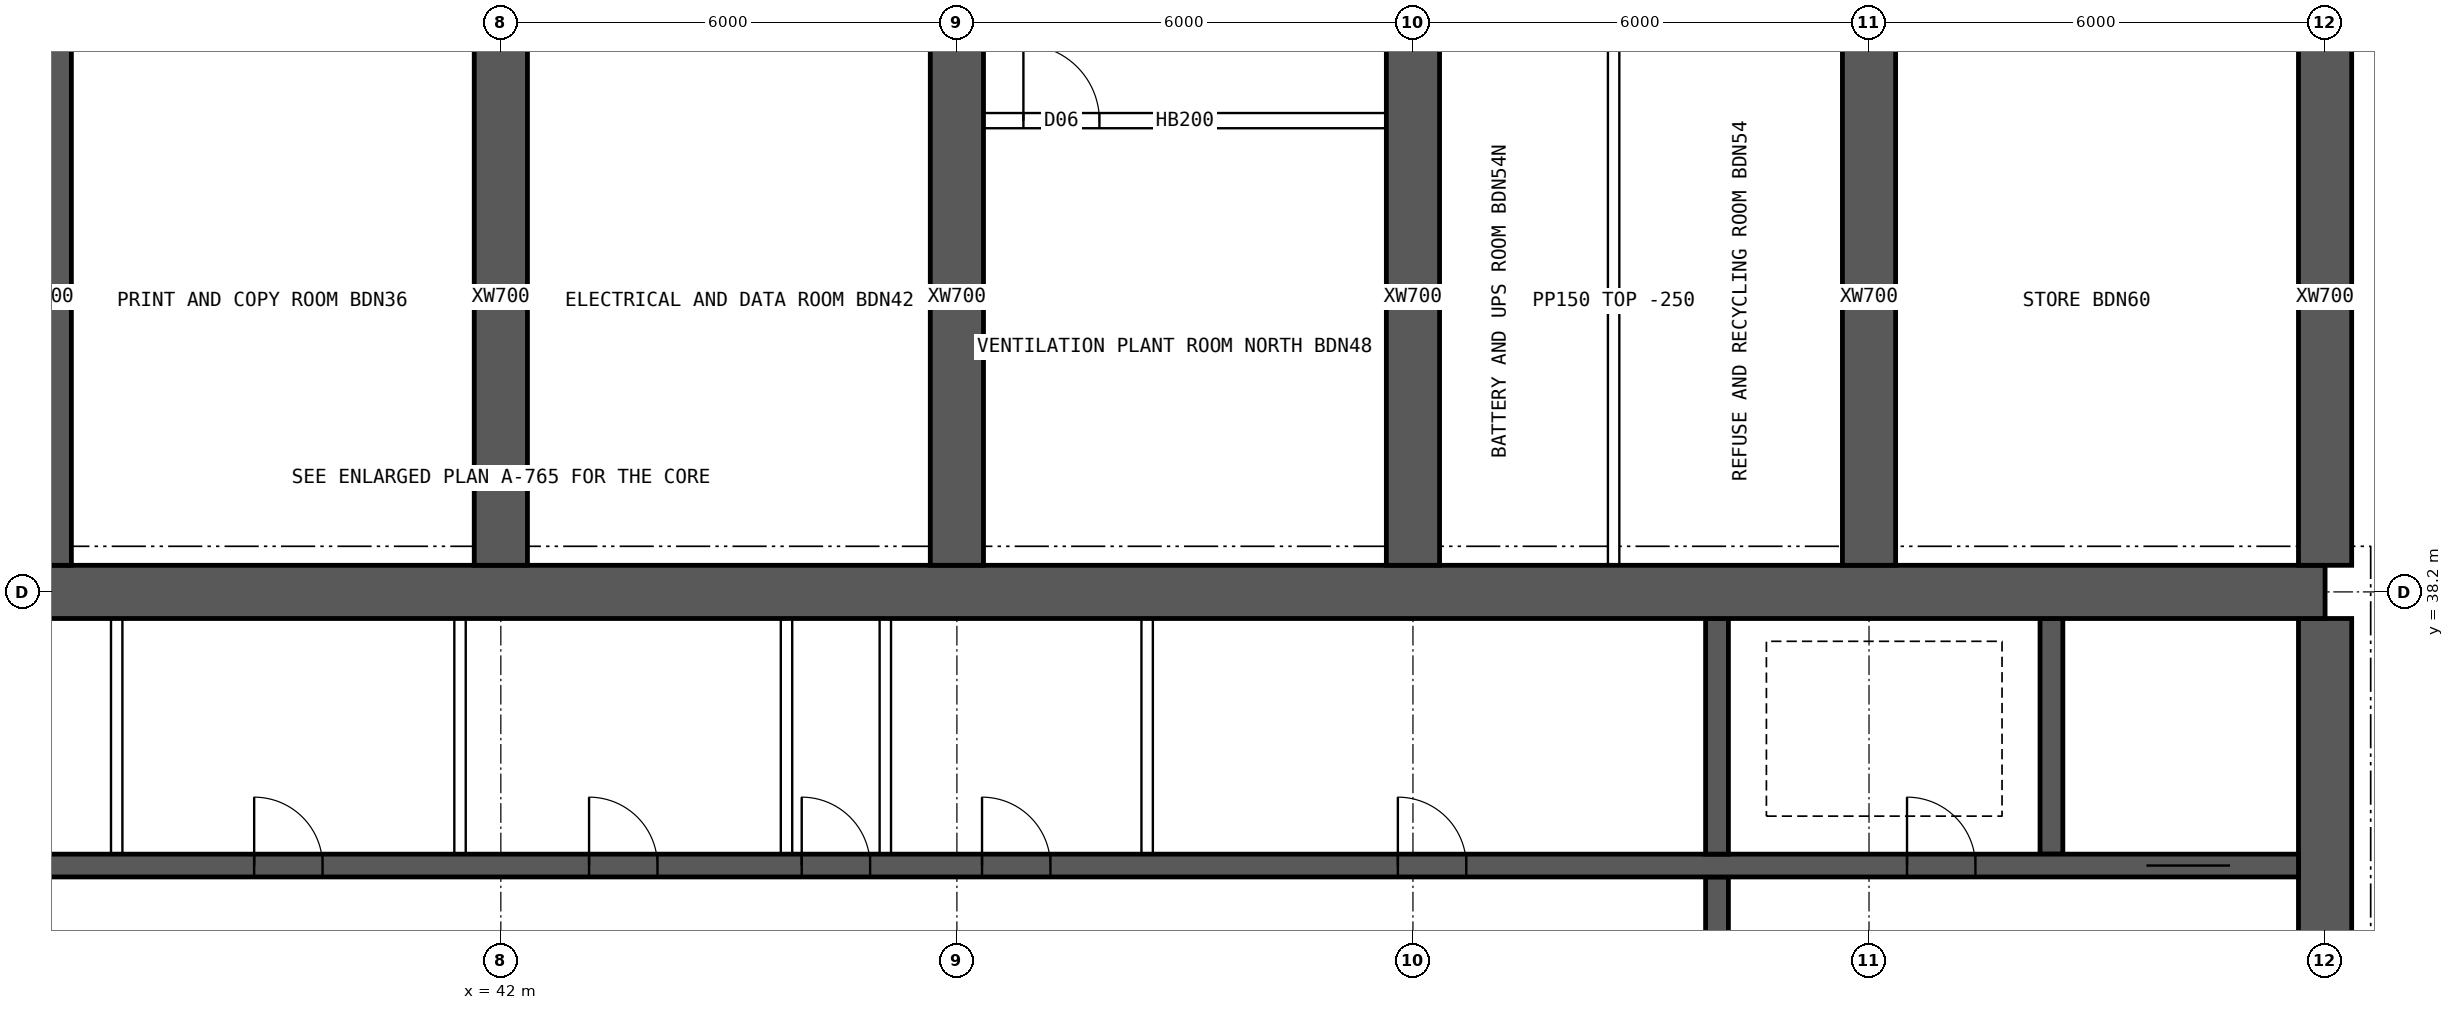
"""IFC4 building model, lengths in metres.
Left out: names, types, materials, properties, quantities, classifications, styles, units other than length and angle.
Written with IfcOpenShell. Run it as: python <this file> out.ifc"""

import sys

from ifc_helpers import new_model, si_unit, direction, frame, frame_2d, origin, place, context, subcontext, project, spatial, rectangle, extrude, element, fill, save


model = new_model("IFC4")
c1 = context("Model", 3, precision=1e-05, world=origin(), true_north=direction((0.0, 1.0)))
c2 = subcontext(c1, "Body", "Model", "MODEL_VIEW")
j1 = project(units=[si_unit("LENGTHUNIT", "METRE"), si_unit("PLANEANGLEUNIT", "RADIAN")], contexts=[c1])
p1 = place(None, origin())
s1 = spatial("IfcSite", under=j1, at=p1, CompositionType="ELEMENT")
p2 = place(p1, origin())
s2 = spatial("IfcBuilding", under=s1, at=p2, CompositionType="ELEMENT")
p3 = place(p2, frame((0.0, 0.0, 250.3)))
s3 = spatial("IfcBuildingStorey", under=s2, at=p3, CompositionType="ELEMENT", Elevation=250.3)
p4 = place(p3, frame((18.0, 38.2, 0.0), z_axis=(0.0, 0.0, 1.0), x_axis=(1.0, 0.0, 0.0)))
e1 = element("IfcWall", 1, at=p4, inside=s3, PredefinedType="SHEAR", context=c2, shape_type="SweptSolid", body=[
    extrude(rectangle(XDim=48.0, YDim=0.7, at=frame_2d((24.0, 0.0))), origin(), (0.0, 0.0, 1.0), 3.75),
])
p5 = place(p3, frame((66.0, 26.15, 0.0), z_axis=(0.0, 0.0, 1.0), x_axis=(0.0, 1.0, 0.0)))
e2 = element("IfcWall", 2, at=p5, inside=s3, PredefinedType="SHEAR", context=c2, shape_type="SweptSolid", body=[
    extrude(rectangle(XDim=11.7, YDim=0.7, at=frame_2d((5.85, 0.0))), origin(), (0.0, 0.0, 1.0), 3.75),
])
p6 = place(p5, frame((5.15, 0.0, 0.0)))
e3 = element("IfcOpeningElement", 3, at=p6, cuts=e2, PredefinedType="OPENING", context=c2, shape_type="SweptSolid", body=[
    extrude(rectangle(XDim=1.2, YDim=2.1, at=frame_2d((0.6, 1.05))), frame((0.0, 0.36, 0.0), z_axis=(0.0, -1.0, 0.0), x_axis=(1.0, 0.0, 0.0)), (0.0, 0.0, 1.0), 0.72),
])
p7 = place(p3, frame((18.35, 34.6, 0.0), z_axis=(0.0, 0.0, 1.0), x_axis=(1.0, 0.0, 0.0)))
e4 = element("IfcWall", 4, at=p7, inside=s3, PredefinedType="SHEAR", context=c2, shape_type="SweptSolid", body=[
    extrude(rectangle(XDim=47.3, YDim=0.3, at=frame_2d((23.65, 0.0))), origin(), (0.0, 0.0, 1.0), 3.75),
])
p8 = place(p7, frame((0.9, 0.0, 0.0)))
e5 = element("IfcOpeningElement", 5, at=p8, cuts=e4, PredefinedType="OPENING", context=c2, shape_type="SweptSolid", body=[
    extrude(rectangle(XDim=1.1, YDim=2.1, at=frame_2d((0.55, 1.05))), frame((0.0, 0.16, 0.0), z_axis=(0.0, -1.0, 0.0), x_axis=(1.0, 0.0, 0.0)), (0.0, 0.0, 1.0), 0.32),
])
p9 = place(p7, frame((45.3, 0.0, 0.0)))
e6 = element("IfcOpeningElement", 6, at=p9, cuts=e4, PredefinedType="OPENING", context=c2, shape_type="SweptSolid", body=[
    extrude(rectangle(XDim=1.1, YDim=2.1, at=frame_2d((0.55, 1.05))), frame((0.0, 0.16, 0.0), z_axis=(0.0, -1.0, 0.0), x_axis=(1.0, 0.0, 0.0)), (0.0, 0.0, 1.0), 0.32),
])
p10 = place(p7, frame((4.25, 0.0, 0.0)))
e7 = element("IfcOpeningElement", 7, at=p10, cuts=e4, PredefinedType="OPENING", context=c2, shape_type="SweptSolid", body=[
    extrude(rectangle(XDim=0.9, YDim=2.1, at=frame_2d((0.45, 1.05))), frame((0.0, 0.16, 0.0), z_axis=(0.0, -1.0, 0.0), x_axis=(1.0, 0.0, 0.0)), (0.0, 0.0, 1.0), 0.32),
])
p11 = place(p7, frame((42.15, 0.0, 0.0)))
e8 = element("IfcOpeningElement", 8, at=p11, cuts=e4, PredefinedType="OPENING", context=c2, shape_type="SweptSolid", body=[
    extrude(rectangle(XDim=0.9, YDim=2.1, at=frame_2d((0.45, 1.05))), frame((0.0, 0.16, 0.0), z_axis=(0.0, -1.0, 0.0), x_axis=(1.0, 0.0, 0.0)), (0.0, 0.0, 1.0), 0.32),
])
p12 = place(p7, frame((9.025, 0.0, 0.0)))
e9 = element("IfcOpeningElement", 9, at=p12, cuts=e4, PredefinedType="OPENING", context=c2, shape_type="SweptSolid", body=[
    extrude(rectangle(XDim=0.9, YDim=2.1, at=frame_2d((0.45, 1.05))), frame((0.0, 0.16, 0.0), z_axis=(0.0, -1.0, 0.0), x_axis=(1.0, 0.0, 0.0)), (0.0, 0.0, 1.0), 0.32),
])
p13 = place(p7, frame((12.999, 0.0, 0.0)))
e10 = element("IfcOpeningElement", 10, at=p13, cuts=e4, PredefinedType="OPENING", context=c2, shape_type="SweptSolid", body=[
    extrude(rectangle(XDim=0.9, YDim=2.1, at=frame_2d((0.45, 1.05))), frame((0.0, 0.16, 0.0), z_axis=(0.0, -1.0, 0.0), x_axis=(1.0, 0.0, 0.0)), (0.0, 0.0, 1.0), 0.32),
])
p14 = place(p7, frame((16.646, 0.0, 0.0)))
e11 = element("IfcOpeningElement", 11, at=p14, cuts=e4, PredefinedType="OPENING", context=c2, shape_type="SweptSolid", body=[
    extrude(rectangle(XDim=0.9, YDim=2.1, at=frame_2d((0.45, 1.05))), frame((0.0, 0.16, 0.0), z_axis=(0.0, -1.0, 0.0), x_axis=(1.0, 0.0, 0.0)), (0.0, 0.0, 1.0), 0.32),
])
p15 = place(p7, frame((20.405, 0.0, 0.0)))
e12 = element("IfcOpeningElement", 12, at=p15, cuts=e4, PredefinedType="OPENING", context=c2, shape_type="SweptSolid", body=[
    extrude(rectangle(XDim=0.9, YDim=2.1, at=frame_2d((0.45, 1.05))), frame((0.0, 0.16, 0.0), z_axis=(0.0, -1.0, 0.0), x_axis=(1.0, 0.0, 0.0)), (0.0, 0.0, 1.0), 0.32),
])
p16 = place(p7, frame((24.811, 0.0, 0.0)))
e13 = element("IfcOpeningElement", 13, at=p16, cuts=e4, PredefinedType="OPENING", context=c2, shape_type="SweptSolid", body=[
    extrude(rectangle(XDim=0.9, YDim=2.1, at=frame_2d((0.45, 1.05))), frame((0.0, 0.16, 0.0), z_axis=(0.0, -1.0, 0.0), x_axis=(1.0, 0.0, 0.0)), (0.0, 0.0, 1.0), 0.32),
])
p17 = place(p7, frame((27.608, 0.0, 0.0)))
e14 = element("IfcOpeningElement", 14, at=p17, cuts=e4, PredefinedType="OPENING", context=c2, shape_type="SweptSolid", body=[
    extrude(rectangle(XDim=0.9, YDim=2.1, at=frame_2d((0.45, 1.05))), frame((0.0, 0.16, 0.0), z_axis=(0.0, -1.0, 0.0), x_axis=(1.0, 0.0, 0.0)), (0.0, 0.0, 1.0), 0.32),
])
p18 = place(p7, frame((29.981, 0.0, 0.0)))
e15 = element("IfcOpeningElement", 15, at=p18, cuts=e4, PredefinedType="OPENING", context=c2, shape_type="SweptSolid", body=[
    extrude(rectangle(XDim=0.9, YDim=2.1, at=frame_2d((0.45, 1.05))), frame((0.0, 0.16, 0.0), z_axis=(0.0, -1.0, 0.0), x_axis=(1.0, 0.0, 0.0)), (0.0, 0.0, 1.0), 0.32),
])
p19 = place(p7, frame((35.451, 0.0, 0.0)))
e16 = element("IfcOpeningElement", 16, at=p19, cuts=e4, PredefinedType="OPENING", context=c2, shape_type="SweptSolid", body=[
    extrude(rectangle(XDim=0.9, YDim=2.1, at=frame_2d((0.45, 1.05))), frame((0.0, 0.16, 0.0), z_axis=(0.0, -1.0, 0.0), x_axis=(1.0, 0.0, 0.0)), (0.0, 0.0, 1.0), 0.32),
])
p20 = place(p3, frame((58.0, 30.55, 0.0), z_axis=(0.0, 0.0, 1.0), x_axis=(0.0, 1.0, 0.0)))
e17 = element("IfcWall", 17, at=p20, inside=s3, PredefinedType="SHEAR", context=c2, shape_type="SweptSolid", body=[
    extrude(rectangle(XDim=3.9, YDim=0.3, at=frame_2d((1.95, 0.0))), origin(), (0.0, 0.0, 1.0), 3.75),
])
p21 = place(p20, frame((1.4, 0.0, 0.0)))
e18 = element("IfcOpeningElement", 18, at=p21, cuts=e17, PredefinedType="OPENING", context=c2, shape_type="SweptSolid", body=[
    extrude(rectangle(XDim=1.2, YDim=2.1, at=frame_2d((0.6, 1.05))), frame((0.0, 0.16, 0.0), z_axis=(0.0, -1.0, 0.0), x_axis=(1.0, 0.0, 0.0)), (0.0, 0.0, 1.0), 0.32),
])
for number, where, z_axis, x_axis in (
    (19, (62.4, 34.75, 0.0), (0.0, 0.0, 1.0), (0.0, 1.0, 0.0)),
    (20, (58.0, 34.75, 0.0), (0.0, 0.0, 1.0), (0.0, 1.0, 0.0)),
):
    element("IfcWall", number, at=place(p3, frame(where, z_axis=z_axis, x_axis=x_axis)), inside=s3, PredefinedType="SHEAR", context=c2, shape_type="SweptSolid", body=[
        extrude(rectangle(XDim=3.1, YDim=0.3, at=frame_2d((1.55, 0.0))), origin(), (0.0, 0.0, 1.0), 3.75),
    ])
for number, where, z_axis, x_axis in (
    (21, (36.0, 38.55, 0.0), (0.0, 0.0, 1.0), (0.0, 1.0, 0.0)),
    (22, (42.0, 38.55, 0.0), (0.0, 0.0, 1.0), (0.0, 1.0, 0.0)),
    (23, (48.0, 38.55, 0.0), (0.0, 0.0, 1.0), (0.0, 1.0, 0.0)),
    (24, (54.0, 38.55, 0.0), (0.0, 0.0, 1.0), (0.0, 1.0, 0.0)),
    (25, (60.0, 38.55, 0.0), (0.0, 0.0, 1.0), (0.0, 1.0, 0.0)),
    (26, (66.0, 38.55, 0.0), (0.0, 0.0, 1.0), (0.0, 1.0, 0.0)),
):
    element("IfcWall", number, at=place(p3, frame(where, z_axis=z_axis, x_axis=x_axis)), inside=s3, PredefinedType="SHEAR", context=c2, shape_type="SweptSolid", body=[
        extrude(rectangle(XDim=7.05, YDim=0.7, at=frame_2d((3.525, 0.0))), origin(), (0.0, 0.0, 1.0), 3.75),
    ])
for number, where, z_axis, x_axis in (
    (27, (36.946, 34.75, 0.0), (0.0, 0.0, 1.0), (0.0, 1.0, 0.0)),
    (28, (41.463, 34.75, 0.0), (0.0, 0.0, 1.0), (0.0, 1.0, 0.0)),
    (29, (45.758, 34.75, 0.0), (0.0, 0.0, 1.0), (0.0, 1.0, 0.0)),
    (30, (47.058, 34.75, 0.0), (0.0, 0.0, 1.0), (0.0, 1.0, 0.0)),
    (31, (50.503, 34.75, 0.0), (0.0, 0.0, 1.0), (0.0, 1.0, 0.0)),
):
    element("IfcWall", number, at=place(p3, frame(where, z_axis=z_axis, x_axis=x_axis)), inside=s3, PredefinedType="SOLIDWALL", context=c2, shape_type="SweptSolid", body=[
        extrude(rectangle(XDim=3.1, YDim=0.15, at=frame_2d((1.55, 0.0))), origin(), (0.0, 0.0, 1.0), 3.5),
    ])
p22 = place(p3, frame((48.35, 44.4, 0.0), z_axis=(0.0, 0.0, 1.0), x_axis=(1.0, 0.0, 0.0)))
e32 = element("IfcWall", 32, at=p22, inside=s3, PredefinedType="SOLIDWALL", context=c2, shape_type="SweptSolid", body=[
    extrude(rectangle(XDim=5.3, YDim=0.2, at=frame_2d((2.65, 0.0))), origin(), (0.0, 0.0, 1.0), 3.5),
])
p23 = place(p22, frame((0.525, 0.0, 0.0)))
e33 = element("IfcOpeningElement", 33, at=p23, cuts=e32, PredefinedType="OPENING", context=c2, shape_type="SweptSolid", body=[
    extrude(rectangle(XDim=1.0, YDim=2.1, at=frame_2d((0.5, 1.05))), frame((0.0, 0.11, 0.0), z_axis=(0.0, -1.0, 0.0), x_axis=(1.0, 0.0, 0.0)), (0.0, 0.0, 1.0), 0.22),
])
p24 = place(p3, frame((56.64, 38.55, 0.0), z_axis=(0.0, 0.0, 1.0), x_axis=(0.0, 1.0, 0.0)))
e34 = element("IfcWall", 34, at=p24, inside=s3, PredefinedType="PARTITIONING", context=c2, shape_type="SweptSolid", body=[
    extrude(rectangle(XDim=6.95, YDim=0.15, at=frame_2d((3.475, 0.0))), origin(), (0.0, 0.0, 1.0), 3.5),
])
p25 = place(p9, origin())
e35 = element("IfcDoor", 35, at=p25, inside=s3, OperationType="DOUBLE_DOOR_SLIDING", PredefinedType="DOOR", context=c2, shape_type="SweptSolid", body=[
    extrude(rectangle(XDim=1.1, YDim=2.1, at=frame_2d((0.55, 1.05))), frame((0.0, 0.025, 0.0), z_axis=(0.0, -1.0, 0.0), x_axis=(1.0, 0.0, 0.0)), (0.0, 0.0, 1.0), 0.05),
])
fill(e6, e35)
p26 = place(p11, origin())
e36 = element("IfcDoor", 36, at=p26, inside=s3, OperationType="SINGLE_SWING_LEFT", PredefinedType="DOOR", context=c2, shape_type="SweptSolid", body=[
    extrude(rectangle(XDim=0.9, YDim=2.1, at=frame_2d((0.45, 1.05))), frame((0.0, 0.025, 0.0), z_axis=(0.0, -1.0, 0.0), x_axis=(1.0, 0.0, 0.0)), (0.0, 0.0, 1.0), 0.05),
])
fill(e8, e36)
p27 = place(p15, origin())
e37 = element("IfcDoor", 37, at=p27, inside=s3, OperationType="SINGLE_SWING_LEFT", PredefinedType="DOOR", context=c2, shape_type="SweptSolid", body=[
    extrude(rectangle(XDim=0.9, YDim=2.1, at=frame_2d((0.45, 1.05))), frame((0.0, 0.025, 0.0), z_axis=(0.0, -1.0, 0.0), x_axis=(1.0, 0.0, 0.0)), (0.0, 0.0, 1.0), 0.05),
])
fill(e12, e37)
p28 = place(p16, origin())
e38 = element("IfcDoor", 38, at=p28, inside=s3, OperationType="SINGLE_SWING_LEFT", PredefinedType="DOOR", context=c2, shape_type="SweptSolid", body=[
    extrude(rectangle(XDim=0.9, YDim=2.1, at=frame_2d((0.45, 1.05))), frame((0.0, 0.025, 0.0), z_axis=(0.0, -1.0, 0.0), x_axis=(1.0, 0.0, 0.0)), (0.0, 0.0, 1.0), 0.05),
])
fill(e13, e38)
p29 = place(p17, origin())
e39 = element("IfcDoor", 39, at=p29, inside=s3, OperationType="SINGLE_SWING_LEFT", PredefinedType="DOOR", context=c2, shape_type="SweptSolid", body=[
    extrude(rectangle(XDim=0.9, YDim=2.1, at=frame_2d((0.45, 1.05))), frame((0.0, 0.025, 0.0), z_axis=(0.0, -1.0, 0.0), x_axis=(1.0, 0.0, 0.0)), (0.0, 0.0, 1.0), 0.05),
])
fill(e14, e39)
p30 = place(p18, origin())
e40 = element("IfcDoor", 40, at=p30, inside=s3, OperationType="SINGLE_SWING_LEFT", PredefinedType="DOOR", context=c2, shape_type="SweptSolid", body=[
    extrude(rectangle(XDim=0.9, YDim=2.1, at=frame_2d((0.45, 1.05))), frame((0.0, 0.025, 0.0), z_axis=(0.0, -1.0, 0.0), x_axis=(1.0, 0.0, 0.0)), (0.0, 0.0, 1.0), 0.05),
])
fill(e15, e40)
p31 = place(p19, origin())
e41 = element("IfcDoor", 41, at=p31, inside=s3, OperationType="SINGLE_SWING_LEFT", PredefinedType="DOOR", context=c2, shape_type="SweptSolid", body=[
    extrude(rectangle(XDim=0.9, YDim=2.1, at=frame_2d((0.45, 1.05))), frame((0.0, 0.025, 0.0), z_axis=(0.0, -1.0, 0.0), x_axis=(1.0, 0.0, 0.0)), (0.0, 0.0, 1.0), 0.05),
])
fill(e16, e41)
p32 = place(p23, origin())
e42 = element("IfcDoor", 42, at=p32, inside=s3, OperationType="SINGLE_SWING_LEFT", PredefinedType="DOOR", context=c2, shape_type="SweptSolid", body=[
    extrude(rectangle(XDim=1.0, YDim=2.1, at=frame_2d((0.5, 1.05))), frame((0.0, 0.025, 0.0), z_axis=(0.0, -1.0, 0.0), x_axis=(1.0, 0.0, 0.0)), (0.0, 0.0, 1.0), 0.05),
])
fill(e33, e42)
save(model, sys.argv[1])
